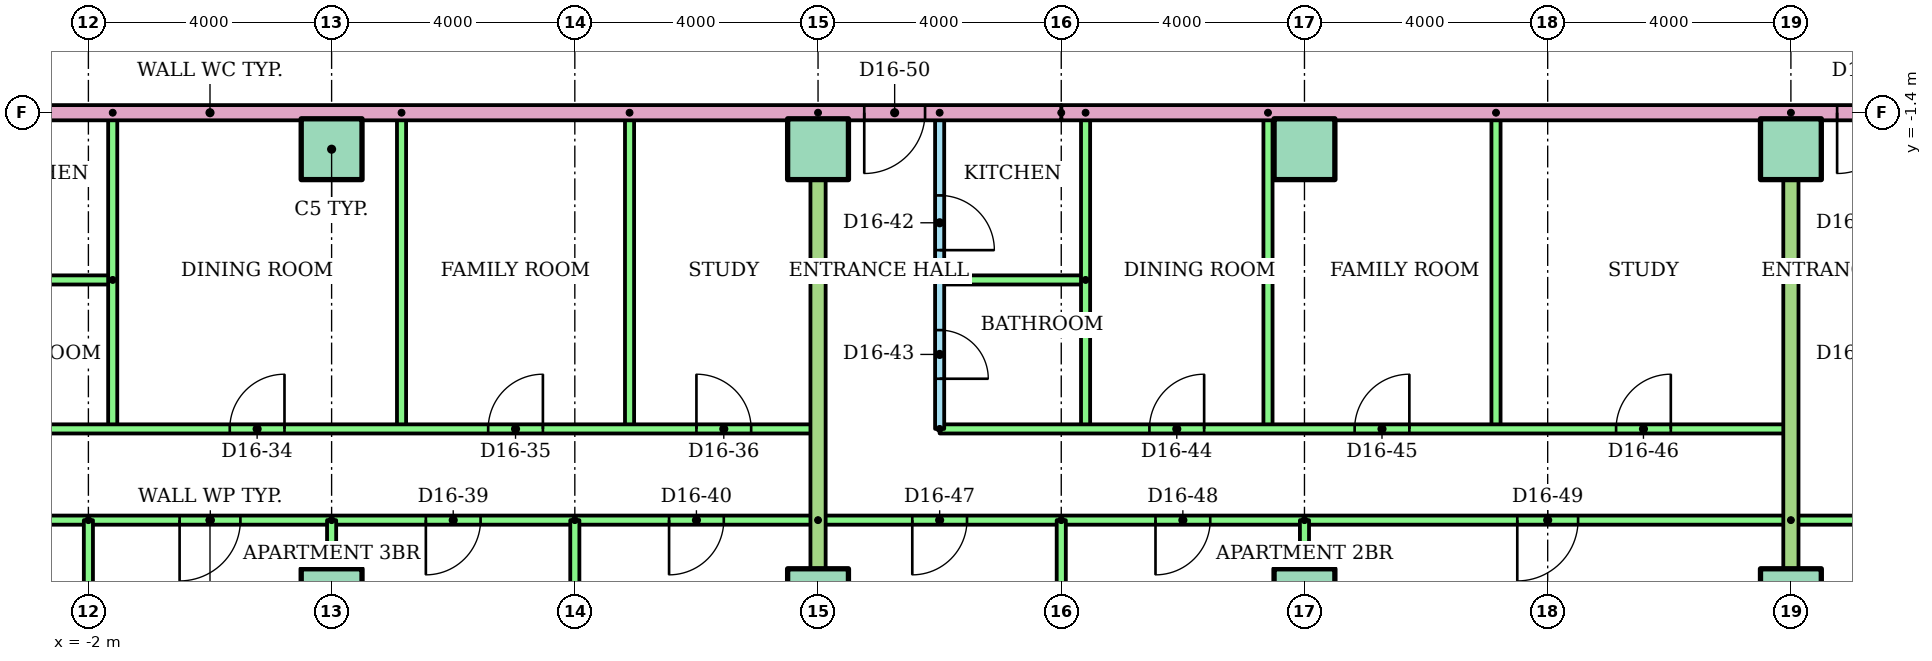
"""IFC4 building model, lengths in metres.
Left out: names, types, materials, properties, quantities, classifications, styles, units other than length and angle.
Written with IfcOpenShell. Run it as: python <this file> out.ifc"""

import sys

from ifc_helpers import new_model, si_unit, direction, frame, frame_2d, origin, origin_2d, place, context, subcontext, project, spatial, rectangle, extrude, element, fill, save


model = new_model("IFC4")
c1 = context("Model", 3, precision=1e-05, world=origin(), true_north=direction((0.0, 1.0)))
c2 = subcontext(c1, "Body", "Model", "MODEL_VIEW")
j1 = project(units=[si_unit("LENGTHUNIT", "METRE"), si_unit("PLANEANGLEUNIT", "RADIAN")], contexts=[c1])
p1 = place(None, origin())
s1 = spatial("IfcSite", under=j1, at=p1, CompositionType="ELEMENT")
p2 = place(p1, origin())
s2 = spatial("IfcBuilding", under=s1, at=p2, CompositionType="ELEMENT")
p3 = place(p2, frame((0.0, 0.0, 60.8)))
s3 = spatial("IfcBuildingStorey", under=s2, at=p3, CompositionType="ELEMENT", Elevation=60.8)
for number, where in (
    (1, (2.0, -9.4, 0.0)),
    (2, (10.0, -9.4, 0.0)),
    (3, (18.0, -9.4, 0.0)),
    (4, (26.0, -9.4, 0.0)),
    (5, (2.0, -2.0, 0.0)),
    (6, (10.0, -2.0, 0.0)),
    (7, (18.0, -2.0, 0.0)),
    (8, (26.0, -2.0, 0.0)),
):
    element("IfcColumn", number, at=place(p3, frame(where)), inside=s3, PredefinedType="COLUMN", context=c2, shape_type="SweptSolid", body=[
        extrude(rectangle(XDim=1.0, YDim=1.0, at=origin_2d()), origin(), (0.0, 0.0, 1.0), 3.2),
    ])
p4 = place(p3, frame((-1.6, -4.15, 0.0), z_axis=(0.0, 0.0, 1.0), x_axis=(-1.0, 0.0, 0.0)))
e9 = element("IfcWall", 9, at=p4, inside=s3, PredefinedType="PARTITIONING", context=c2, shape_type="SweptSolid", body=[
    extrude(rectangle(XDim=2.4, YDim=0.15, at=frame_2d((1.2, 0.0))), origin(), (0.0, 0.0, 1.0), 2.4),
])
for number, where, z_axis, x_axis in (
    (10, (-1.6, -1.4, 0.0), (0.0, 0.0, 1.0), (0.0, -1.0, 0.0)),
    (11, (3.15, -1.4, 0.0), (0.0, 0.0, 1.0), (0.0, -1.0, 0.0)),
    (12, (6.9, -1.4, 0.0), (0.0, 0.0, 1.0), (0.0, -1.0, 0.0)),
):
    element("IfcWall", number, at=place(p3, frame(where, z_axis=z_axis, x_axis=x_axis)), inside=s3, PredefinedType="PARTITIONING", context=c2, shape_type="SweptSolid", body=[
        extrude(rectangle(XDim=5.2, YDim=0.15, at=frame_2d((2.6, 0.0))), origin(), (0.0, 0.0, 1.0), 2.4),
    ])
p5 = place(p3, frame((-4.0, -6.6, 0.0)))
e13 = element("IfcWall", 13, at=p5, inside=s3, PredefinedType="PARTITIONING", context=c2, shape_type="SweptSolid", body=[
    extrude(rectangle(XDim=14.0, YDim=0.15, at=frame_2d((7.0, 0.0))), origin(), (0.0, 0.0, 1.0), 2.4),
])
p6 = place(p5, frame((4.325, 0.0, 0.0)))
e14 = element("IfcOpeningElement", 14, at=p6, cuts=e13, PredefinedType="OPENING", context=c2, shape_type="SweptSolid", body=[
    extrude(rectangle(XDim=0.9, YDim=2.1, at=frame_2d((0.45, 1.05))), frame((0.0, 0.085, 0.0), z_axis=(0.0, -1.0, 0.0), x_axis=(1.0, 0.0, 0.0)), (0.0, 0.0, 1.0), 0.17),
])
p7 = place(p5, frame((8.575, 0.0, 0.0)))
e15 = element("IfcOpeningElement", 15, at=p7, cuts=e13, PredefinedType="OPENING", context=c2, shape_type="SweptSolid", body=[
    extrude(rectangle(XDim=0.9, YDim=2.1, at=frame_2d((0.45, 1.05))), frame((0.0, 0.085, 0.0), z_axis=(0.0, -1.0, 0.0), x_axis=(1.0, 0.0, 0.0)), (0.0, 0.0, 1.0), 0.17),
])
p8 = place(p5, frame((12.0, 0.0, 0.0)))
e16 = element("IfcOpeningElement", 16, at=p8, cuts=e13, PredefinedType="OPENING", context=c2, shape_type="SweptSolid", body=[
    extrude(rectangle(XDim=0.9, YDim=2.1, at=frame_2d((0.45, 1.05))), frame((0.0, 0.085, 0.0), z_axis=(0.0, -1.0, 0.0), x_axis=(1.0, 0.0, 0.0)), (0.0, 0.0, 1.0), 0.17),
])
p9 = place(p3, frame((10.0, -8.1, 0.0), z_axis=(0.0, 0.0, 1.0), x_axis=(-1.0, 0.0, 0.0)))
e17 = element("IfcWall", 17, at=p9, inside=s3, PredefinedType="PARTITIONING", context=c2, shape_type="SweptSolid", body=[
    extrude(rectangle(XDim=16.0, YDim=0.15, at=frame_2d((8.0, 0.0))), origin(), (0.0, 0.0, 1.0), 2.4),
])
p10 = place(p9, frame((13.55, 0.0, 0.0)))
e18 = element("IfcOpeningElement", 18, at=p10, cuts=e17, PredefinedType="OPENING", context=c2, shape_type="SweptSolid", body=[
    extrude(rectangle(XDim=0.9, YDim=2.1, at=frame_2d((0.45, 1.05))), frame((0.0, 0.085, 0.0), z_axis=(0.0, -1.0, 0.0), x_axis=(1.0, 0.0, 0.0)), (0.0, 0.0, 1.0), 0.17),
])
p11 = place(p9, frame((9.5, 0.0, 0.0)))
e19 = element("IfcOpeningElement", 19, at=p11, cuts=e17, PredefinedType="OPENING", context=c2, shape_type="SweptSolid", body=[
    extrude(rectangle(XDim=1.0, YDim=2.1, at=frame_2d((0.5, 1.05))), frame((0.0, 0.085, 0.0), z_axis=(0.0, -1.0, 0.0), x_axis=(1.0, 0.0, 0.0)), (0.0, 0.0, 1.0), 0.17),
])
p12 = place(p9, frame((5.55, 0.0, 0.0)))
e20 = element("IfcOpeningElement", 20, at=p12, cuts=e17, PredefinedType="OPENING", context=c2, shape_type="SweptSolid", body=[
    extrude(rectangle(XDim=0.9, YDim=2.1, at=frame_2d((0.45, 1.05))), frame((0.0, 0.085, 0.0), z_axis=(0.0, -1.0, 0.0), x_axis=(1.0, 0.0, 0.0)), (0.0, 0.0, 1.0), 0.17),
])
p13 = place(p9, frame((1.55, 0.0, 0.0)))
e21 = element("IfcOpeningElement", 21, at=p13, cuts=e17, PredefinedType="OPENING", context=c2, shape_type="SweptSolid", body=[
    extrude(rectangle(XDim=0.9, YDim=2.1, at=frame_2d((0.45, 1.05))), frame((0.0, 0.085, 0.0), z_axis=(0.0, -1.0, 0.0), x_axis=(1.0, 0.0, 0.0)), (0.0, 0.0, 1.0), 0.17),
])
p14 = place(p3, frame((-2.0, -8.1, 0.0), z_axis=(0.0, 0.0, 1.0), x_axis=(0.0, -1.0, 0.0)))
e22 = element("IfcWall", 22, at=p14, inside=s3, PredefinedType="PARTITIONING", context=c2, shape_type="SweptSolid", body=[
    extrude(rectangle(XDim=8.021, YDim=0.15, at=frame_2d((4.01, 0.0))), origin(), (0.0, 0.0, 1.0), 2.4),
])
p15 = place(p3, frame((2.0, -8.1, 0.0), z_axis=(0.0, 0.0, 1.0), x_axis=(0.0, -1.0, 0.0)))
e23 = element("IfcWall", 23, at=p15, inside=s3, PredefinedType="PARTITIONING", context=c2, shape_type="SweptSolid", body=[
    extrude(rectangle(XDim=8.01, YDim=0.15, at=frame_2d((4.005, 0.0))), origin(), (0.0, 0.0, 1.0), 2.4),
])
p16 = place(p3, frame((6.0, -8.1, 0.0), z_axis=(0.0, 0.0, 1.0), x_axis=(0.0, -1.0, 0.0)))
e24 = element("IfcWall", 24, at=p16, inside=s3, PredefinedType="PARTITIONING", context=c2, shape_type="SweptSolid", body=[
    extrude(rectangle(XDim=8.021, YDim=0.15, at=frame_2d((4.01, 0.0))), origin(), (0.0, 0.0, 1.0), 2.4),
])
p17 = place(p3, frame((12.0, -1.4, 0.0), z_axis=(0.0, 0.0, 1.0), x_axis=(0.0, -1.0, 0.0)))
e25 = element("IfcWall", 25, at=p17, inside=s3, PredefinedType="PARTITIONING", context=c2, shape_type="SweptSolid", body=[
    extrude(rectangle(XDim=5.2, YDim=0.15, at=frame_2d((2.6, 0.0))), origin(), (0.0, 0.0, 1.0), 2.4),
])
p18 = place(p17, frame((1.36, 0.0, 0.0)))
e26 = element("IfcOpeningElement", 26, at=p18, cuts=e25, PredefinedType="OPENING", context=c2, shape_type="SweptSolid", body=[
    extrude(rectangle(XDim=0.9, YDim=2.1, at=frame_2d((0.45, 1.05))), frame((0.0, 0.085, 0.0), z_axis=(0.0, -1.0, 0.0), x_axis=(1.0, 0.0, 0.0)), (0.0, 0.0, 1.0), 0.17),
])
p19 = place(p17, frame((3.575, 0.0, 0.0)))
e27 = element("IfcOpeningElement", 27, at=p19, cuts=e25, PredefinedType="OPENING", context=c2, shape_type="SweptSolid", body=[
    extrude(rectangle(XDim=0.8, YDim=2.1, at=frame_2d((0.4, 1.05))), frame((0.0, 0.085, 0.0), z_axis=(0.0, -1.0, 0.0), x_axis=(1.0, 0.0, 0.0)), (0.0, 0.0, 1.0), 0.17),
])
p20 = place(p3, frame((14.4, -4.15, 0.0), z_axis=(0.0, 0.0, 1.0), x_axis=(-1.0, 0.0, 0.0)))
e28 = element("IfcWall", 28, at=p20, inside=s3, PredefinedType="PARTITIONING", context=c2, shape_type="SweptSolid", body=[
    extrude(rectangle(XDim=2.4, YDim=0.15, at=frame_2d((1.2, 0.0))), origin(), (0.0, 0.0, 1.0), 2.4),
])
for number, where, z_axis, x_axis in (
    (29, (14.4, -1.4, 0.0), (0.0, 0.0, 1.0), (0.0, -1.0, 0.0)),
    (30, (17.4, -1.4, 0.0), (0.0, 0.0, 1.0), (0.0, -1.0, 0.0)),
    (31, (21.15, -1.4, 0.0), (0.0, 0.0, 1.0), (0.0, -1.0, 0.0)),
):
    element("IfcWall", number, at=place(p3, frame(where, z_axis=z_axis, x_axis=x_axis)), inside=s3, PredefinedType="PARTITIONING", context=c2, shape_type="SweptSolid", body=[
        extrude(rectangle(XDim=5.2, YDim=0.15, at=frame_2d((2.6, 0.0))), origin(), (0.0, 0.0, 1.0), 2.4),
    ])
p21 = place(p3, frame((12.0, -6.6, 0.0)))
e32 = element("IfcWall", 32, at=p21, inside=s3, PredefinedType="PARTITIONING", context=c2, shape_type="SweptSolid", body=[
    extrude(rectangle(XDim=14.0, YDim=0.15, at=frame_2d((7.0, 0.0))), origin(), (0.0, 0.0, 1.0), 2.4),
])
p22 = place(p21, frame((3.45, 0.0, 0.0)))
e33 = element("IfcOpeningElement", 33, at=p22, cuts=e32, PredefinedType="OPENING", context=c2, shape_type="SweptSolid", body=[
    extrude(rectangle(XDim=0.9, YDim=2.1, at=frame_2d((0.45, 1.05))), frame((0.0, 0.085, 0.0), z_axis=(0.0, -1.0, 0.0), x_axis=(1.0, 0.0, 0.0)), (0.0, 0.0, 1.0), 0.17),
])
p23 = place(p21, frame((6.825, 0.0, 0.0)))
e34 = element("IfcOpeningElement", 34, at=p23, cuts=e32, PredefinedType="OPENING", context=c2, shape_type="SweptSolid", body=[
    extrude(rectangle(XDim=0.9, YDim=2.1, at=frame_2d((0.45, 1.05))), frame((0.0, 0.085, 0.0), z_axis=(0.0, -1.0, 0.0), x_axis=(1.0, 0.0, 0.0)), (0.0, 0.0, 1.0), 0.17),
])
p24 = place(p21, frame((11.125, 0.0, 0.0)))
e35 = element("IfcOpeningElement", 35, at=p24, cuts=e32, PredefinedType="OPENING", context=c2, shape_type="SweptSolid", body=[
    extrude(rectangle(XDim=0.9, YDim=2.1, at=frame_2d((0.45, 1.05))), frame((0.0, 0.085, 0.0), z_axis=(0.0, -1.0, 0.0), x_axis=(1.0, 0.0, 0.0)), (0.0, 0.0, 1.0), 0.17),
])
p25 = place(p3, frame((26.0, -8.1, 0.0), z_axis=(0.0, 0.0, 1.0), x_axis=(-1.0, 0.0, 0.0)))
e36 = element("IfcWall", 36, at=p25, inside=s3, PredefinedType="PARTITIONING", context=c2, shape_type="SweptSolid", body=[
    extrude(rectangle(XDim=16.0, YDim=0.15, at=frame_2d((8.0, 0.0))), origin(), (0.0, 0.0, 1.0), 2.4),
])
p26 = place(p25, frame((13.55, 0.0, 0.0)))
e37 = element("IfcOpeningElement", 37, at=p26, cuts=e36, PredefinedType="OPENING", context=c2, shape_type="SweptSolid", body=[
    extrude(rectangle(XDim=0.9, YDim=2.1, at=frame_2d((0.45, 1.05))), frame((0.0, 0.085, 0.0), z_axis=(0.0, -1.0, 0.0), x_axis=(1.0, 0.0, 0.0)), (0.0, 0.0, 1.0), 0.17),
])
p27 = place(p25, frame((9.55, 0.0, 0.0)))
e38 = element("IfcOpeningElement", 38, at=p27, cuts=e36, PredefinedType="OPENING", context=c2, shape_type="SweptSolid", body=[
    extrude(rectangle(XDim=0.9, YDim=2.1, at=frame_2d((0.45, 1.05))), frame((0.0, 0.085, 0.0), z_axis=(0.0, -1.0, 0.0), x_axis=(1.0, 0.0, 0.0)), (0.0, 0.0, 1.0), 0.17),
])
p28 = place(p25, frame((3.5, 0.0, 0.0)))
e39 = element("IfcOpeningElement", 39, at=p28, cuts=e36, PredefinedType="OPENING", context=c2, shape_type="SweptSolid", body=[
    extrude(rectangle(XDim=1.0, YDim=2.1, at=frame_2d((0.5, 1.05))), frame((0.0, 0.085, 0.0), z_axis=(0.0, -1.0, 0.0), x_axis=(1.0, 0.0, 0.0)), (0.0, 0.0, 1.0), 0.17),
])
p29 = place(p3, frame((14.0, -8.1, 0.0), z_axis=(0.0, 0.0, 1.0), x_axis=(0.0, -1.0, 0.0)))
e40 = element("IfcWall", 40, at=p29, inside=s3, PredefinedType="PARTITIONING", context=c2, shape_type="SweptSolid", body=[
    extrude(rectangle(XDim=8.021, YDim=0.15, at=frame_2d((4.01, 0.0))), origin(), (0.0, 0.0, 1.0), 2.4),
])
p30 = place(p3, frame((18.0, -8.1, 0.0), z_axis=(0.0, 0.0, 1.0), x_axis=(0.0, -1.0, 0.0)))
e41 = element("IfcWall", 41, at=p30, inside=s3, PredefinedType="PARTITIONING", context=c2, shape_type="SweptSolid", body=[
    extrude(rectangle(XDim=8.01, YDim=0.15, at=frame_2d((4.005, 0.0))), origin(), (0.0, 0.0, 1.0), 2.4),
])
p31 = place(p3, frame((10.0, -1.4, 0.0), z_axis=(0.0, 0.0, 1.0), x_axis=(0.0, -1.0, 0.0)))
e42 = element("IfcWall", 42, at=p31, inside=s3, PredefinedType="PARTITIONING", context=c2, shape_type="SweptSolid", body=[
    extrude(rectangle(XDim=14.71, YDim=0.25, at=frame_2d((7.355, 0.0))), origin(), (0.0, 0.0, 1.0), 2.4),
])
p32 = place(p3, frame((36.52, -8.1, 0.0), z_axis=(0.0, 0.0, 1.0), x_axis=(-1.0, 0.0, 0.0)))
e43 = element("IfcWall", 43, at=p32, inside=s3, PredefinedType="PARTITIONING", context=c2, shape_type="SweptSolid", body=[
    extrude(rectangle(XDim=10.52, YDim=0.15, at=frame_2d((5.26, 0.0))), origin(), (0.0, 0.0, 1.0), 2.4),
])
p33 = place(p32, frame((7.12, 0.0, 0.0)))
e44 = element("IfcOpeningElement", 44, at=p33, cuts=e43, PredefinedType="OPENING", context=c2, shape_type="SweptSolid", body=[
    extrude(rectangle(XDim=1.0, YDim=2.1, at=frame_2d((0.5, 1.05))), frame((0.0, 0.085, 0.0), z_axis=(0.0, -1.0, 0.0), x_axis=(1.0, 0.0, 0.0)), (0.0, 0.0, 1.0), 0.17),
])
p34 = place(p32, frame((0.76, 0.0, 0.0)))
e45 = element("IfcOpeningElement", 45, at=p34, cuts=e43, PredefinedType="OPENING", context=c2, shape_type="SweptSolid", body=[
    extrude(rectangle(XDim=1.0, YDim=2.1, at=frame_2d((0.5, 1.05))), frame((0.0, 0.085, 0.0), z_axis=(0.0, -1.0, 0.0), x_axis=(1.0, 0.0, 0.0)), (0.0, 0.0, 1.0), 0.17),
])
p35 = place(p3, frame((26.0, -1.4, 0.0), z_axis=(0.0, 0.0, 1.0), x_axis=(0.0, -1.0, 0.0)))
e46 = element("IfcWall", 46, at=p35, inside=s3, PredefinedType="PARTITIONING", context=c2, shape_type="SweptSolid", body=[
    extrude(rectangle(XDim=14.71, YDim=0.25, at=frame_2d((7.355, 0.0))), origin(), (0.0, 0.0, 1.0), 2.4),
])
p36 = place(p3, frame((29.0, -1.4, 0.0), z_axis=(0.0, 0.0, 1.0), x_axis=(-1.0, 0.0, 0.0)))
e47 = element("IfcWall", 47, at=p36, inside=s3, PredefinedType="PARTITIONING", context=c2, shape_type="SweptSolid", body=[
    extrude(rectangle(XDim=15.0, YDim=0.25, at=frame_2d((7.5, 0.0))), origin(), (0.0, 0.0, 1.0), 2.4),
])
p37 = place(p36, frame((1.24, 0.0, 0.0)))
e48 = element("IfcOpeningElement", 48, at=p37, cuts=e47, PredefinedType="OPENING", context=c2, shape_type="SweptSolid", body=[
    extrude(rectangle(XDim=1.0, YDim=2.1, at=frame_2d((0.5, 1.05))), frame((0.0, 0.135, 0.0), z_axis=(0.0, -1.0, 0.0), x_axis=(1.0, 0.0, 0.0)), (0.0, 0.0, 1.0), 0.27),
])
p38 = place(p3, frame((14.0, -1.4, 0.0), z_axis=(0.0, 0.0, 1.0), x_axis=(-1.0, 0.0, 0.0)))
e49 = element("IfcWall", 49, at=p38, inside=s3, PredefinedType="PARTITIONING", context=c2, shape_type="SweptSolid", body=[
    extrude(rectangle(XDim=28.0, YDim=0.25, at=frame_2d((14.0, 0.0))), origin(), (0.0, 0.0, 1.0), 2.4),
])
p39 = place(p38, frame((20.76, 0.0, 0.0)))
e50 = element("IfcOpeningElement", 50, at=p39, cuts=e49, PredefinedType="OPENING", context=c2, shape_type="SweptSolid", body=[
    extrude(rectangle(XDim=1.0, YDim=2.1, at=frame_2d((0.5, 1.05))), frame((0.0, 0.135, 0.0), z_axis=(0.0, -1.0, 0.0), x_axis=(1.0, 0.0, 0.0)), (0.0, 0.0, 1.0), 0.27),
])
p40 = place(p38, frame((18.24, 0.0, 0.0)))
e51 = element("IfcOpeningElement", 51, at=p40, cuts=e49, PredefinedType="OPENING", context=c2, shape_type="SweptSolid", body=[
    extrude(rectangle(XDim=1.0, YDim=2.1, at=frame_2d((0.5, 1.05))), frame((0.0, 0.135, 0.0), z_axis=(0.0, -1.0, 0.0), x_axis=(1.0, 0.0, 0.0)), (0.0, 0.0, 1.0), 0.27),
])
p41 = place(p38, frame((2.24, 0.0, 0.0)))
e52 = element("IfcOpeningElement", 52, at=p41, cuts=e49, PredefinedType="OPENING", context=c2, shape_type="SweptSolid", body=[
    extrude(rectangle(XDim=1.0, YDim=2.1, at=frame_2d((0.5, 1.05))), frame((0.0, 0.135, 0.0), z_axis=(0.0, -1.0, 0.0), x_axis=(1.0, 0.0, 0.0)), (0.0, 0.0, 1.0), 0.27),
])
p42 = place(p6, origin())
e53 = element("IfcDoor", 53, at=p42, inside=s3, OperationType="SINGLE_SWING_RIGHT", PredefinedType="DOOR", context=c2, shape_type="SweptSolid", body=[
    extrude(rectangle(XDim=0.9, YDim=2.1, at=frame_2d((0.45, 1.05))), frame((0.0, 0.025, 0.0), z_axis=(0.0, -1.0, 0.0), x_axis=(1.0, 0.0, 0.0)), (0.0, 0.0, 1.0), 0.05),
])
fill(e14, e53)
p43 = place(p7, origin())
e54 = element("IfcDoor", 54, at=p43, inside=s3, OperationType="SINGLE_SWING_RIGHT", PredefinedType="DOOR", context=c2, shape_type="SweptSolid", body=[
    extrude(rectangle(XDim=0.9, YDim=2.1, at=frame_2d((0.45, 1.05))), frame((0.0, 0.025, 0.0), z_axis=(0.0, -1.0, 0.0), x_axis=(1.0, 0.0, 0.0)), (0.0, 0.0, 1.0), 0.05),
])
fill(e15, e54)
p44 = place(p8, origin())
e55 = element("IfcDoor", 55, at=p44, inside=s3, OperationType="SINGLE_SWING_LEFT", PredefinedType="DOOR", context=c2, shape_type="SweptSolid", body=[
    extrude(rectangle(XDim=0.9, YDim=2.1, at=frame_2d((0.45, 1.05))), frame((0.0, 0.025, 0.0), z_axis=(0.0, -1.0, 0.0), x_axis=(1.0, 0.0, 0.0)), (0.0, 0.0, 1.0), 0.05),
])
fill(e16, e55)
p45 = place(p11, origin())
e56 = element("IfcDoor", 56, at=p45, inside=s3, OperationType="SINGLE_SWING_RIGHT", PredefinedType="DOOR", context=c2, shape_type="SweptSolid", body=[
    extrude(rectangle(XDim=1.0, YDim=2.1, at=frame_2d((0.5, 1.05))), frame((0.0, 0.025, 0.0), z_axis=(0.0, -1.0, 0.0), x_axis=(1.0, 0.0, 0.0)), (0.0, 0.0, 1.0), 0.05),
])
fill(e19, e56)
p46 = place(p12, origin())
e57 = element("IfcDoor", 57, at=p46, inside=s3, OperationType="SINGLE_SWING_RIGHT", PredefinedType="DOOR", context=c2, shape_type="SweptSolid", body=[
    extrude(rectangle(XDim=0.9, YDim=2.1, at=frame_2d((0.45, 1.05))), frame((0.0, 0.025, 0.0), z_axis=(0.0, -1.0, 0.0), x_axis=(1.0, 0.0, 0.0)), (0.0, 0.0, 1.0), 0.05),
])
fill(e20, e57)
p47 = place(p13, origin())
e58 = element("IfcDoor", 58, at=p47, inside=s3, OperationType="SINGLE_SWING_RIGHT", PredefinedType="DOOR", context=c2, shape_type="SweptSolid", body=[
    extrude(rectangle(XDim=0.9, YDim=2.1, at=frame_2d((0.45, 1.05))), frame((0.0, 0.025, 0.0), z_axis=(0.0, -1.0, 0.0), x_axis=(1.0, 0.0, 0.0)), (0.0, 0.0, 1.0), 0.05),
])
fill(e21, e58)
p48 = place(p18, origin())
e59 = element("IfcDoor", 59, at=p48, inside=s3, OperationType="SINGLE_SWING_RIGHT", PredefinedType="DOOR", context=c2, shape_type="SweptSolid", body=[
    extrude(rectangle(XDim=0.9, YDim=2.1, at=frame_2d((0.45, 1.05))), frame((0.0, 0.025, 0.0), z_axis=(0.0, -1.0, 0.0), x_axis=(1.0, 0.0, 0.0)), (0.0, 0.0, 1.0), 0.05),
])
fill(e26, e59)
p49 = place(p19, origin())
e60 = element("IfcDoor", 60, at=p49, inside=s3, OperationType="SINGLE_SWING_RIGHT", PredefinedType="DOOR", context=c2, shape_type="SweptSolid", body=[
    extrude(rectangle(XDim=0.8, YDim=2.1, at=frame_2d((0.4, 1.05))), frame((0.0, 0.025, 0.0), z_axis=(0.0, -1.0, 0.0), x_axis=(1.0, 0.0, 0.0)), (0.0, 0.0, 1.0), 0.05),
])
fill(e27, e60)
p50 = place(p22, origin())
e61 = element("IfcDoor", 61, at=p50, inside=s3, OperationType="SINGLE_SWING_RIGHT", PredefinedType="DOOR", context=c2, shape_type="SweptSolid", body=[
    extrude(rectangle(XDim=0.9, YDim=2.1, at=frame_2d((0.45, 1.05))), frame((0.0, 0.025, 0.0), z_axis=(0.0, -1.0, 0.0), x_axis=(1.0, 0.0, 0.0)), (0.0, 0.0, 1.0), 0.05),
])
fill(e33, e61)
p51 = place(p23, origin())
e62 = element("IfcDoor", 62, at=p51, inside=s3, OperationType="SINGLE_SWING_RIGHT", PredefinedType="DOOR", context=c2, shape_type="SweptSolid", body=[
    extrude(rectangle(XDim=0.9, YDim=2.1, at=frame_2d((0.45, 1.05))), frame((0.0, 0.025, 0.0), z_axis=(0.0, -1.0, 0.0), x_axis=(1.0, 0.0, 0.0)), (0.0, 0.0, 1.0), 0.05),
])
fill(e34, e62)
p52 = place(p24, origin())
e63 = element("IfcDoor", 63, at=p52, inside=s3, OperationType="SINGLE_SWING_RIGHT", PredefinedType="DOOR", context=c2, shape_type="SweptSolid", body=[
    extrude(rectangle(XDim=0.9, YDim=2.1, at=frame_2d((0.45, 1.05))), frame((0.0, 0.025, 0.0), z_axis=(0.0, -1.0, 0.0), x_axis=(1.0, 0.0, 0.0)), (0.0, 0.0, 1.0), 0.05),
])
fill(e35, e63)
p53 = place(p26, origin())
e64 = element("IfcDoor", 64, at=p53, inside=s3, OperationType="SINGLE_SWING_RIGHT", PredefinedType="DOOR", context=c2, shape_type="SweptSolid", body=[
    extrude(rectangle(XDim=0.9, YDim=2.1, at=frame_2d((0.45, 1.05))), frame((0.0, 0.025, 0.0), z_axis=(0.0, -1.0, 0.0), x_axis=(1.0, 0.0, 0.0)), (0.0, 0.0, 1.0), 0.05),
])
fill(e37, e64)
p54 = place(p27, origin())
e65 = element("IfcDoor", 65, at=p54, inside=s3, OperationType="SINGLE_SWING_RIGHT", PredefinedType="DOOR", context=c2, shape_type="SweptSolid", body=[
    extrude(rectangle(XDim=0.9, YDim=2.1, at=frame_2d((0.45, 1.05))), frame((0.0, 0.025, 0.0), z_axis=(0.0, -1.0, 0.0), x_axis=(1.0, 0.0, 0.0)), (0.0, 0.0, 1.0), 0.05),
])
fill(e38, e65)
p55 = place(p28, origin())
e66 = element("IfcDoor", 66, at=p55, inside=s3, OperationType="SINGLE_SWING_RIGHT", PredefinedType="DOOR", context=c2, shape_type="SweptSolid", body=[
    extrude(rectangle(XDim=1.0, YDim=2.1, at=frame_2d((0.5, 1.05))), frame((0.0, 0.025, 0.0), z_axis=(0.0, -1.0, 0.0), x_axis=(1.0, 0.0, 0.0)), (0.0, 0.0, 1.0), 0.05),
])
fill(e39, e66)
p56 = place(p41, origin())
e67 = element("IfcDoor", 67, at=p56, inside=s3, OperationType="SINGLE_SWING_RIGHT", PredefinedType="DOOR", context=c2, shape_type="SweptSolid", body=[
    extrude(rectangle(XDim=1.0, YDim=2.1, at=frame_2d((0.5, 1.05))), frame((0.0, 0.025, 0.0), z_axis=(0.0, -1.0, 0.0), x_axis=(1.0, 0.0, 0.0)), (0.0, 0.0, 1.0), 0.05),
])
fill(e52, e67)
p57 = place(p37, origin())
e68 = element("IfcDoor", 68, at=p57, inside=s3, OperationType="SINGLE_SWING_RIGHT", PredefinedType="DOOR", context=c2, shape_type="SweptSolid", body=[
    extrude(rectangle(XDim=1.0, YDim=2.1, at=frame_2d((0.5, 1.05))), frame((0.0, 0.025, 0.0), z_axis=(0.0, -1.0, 0.0), x_axis=(1.0, 0.0, 0.0)), (0.0, 0.0, 1.0), 0.05),
])
fill(e48, e68)
save(model, sys.argv[1])
